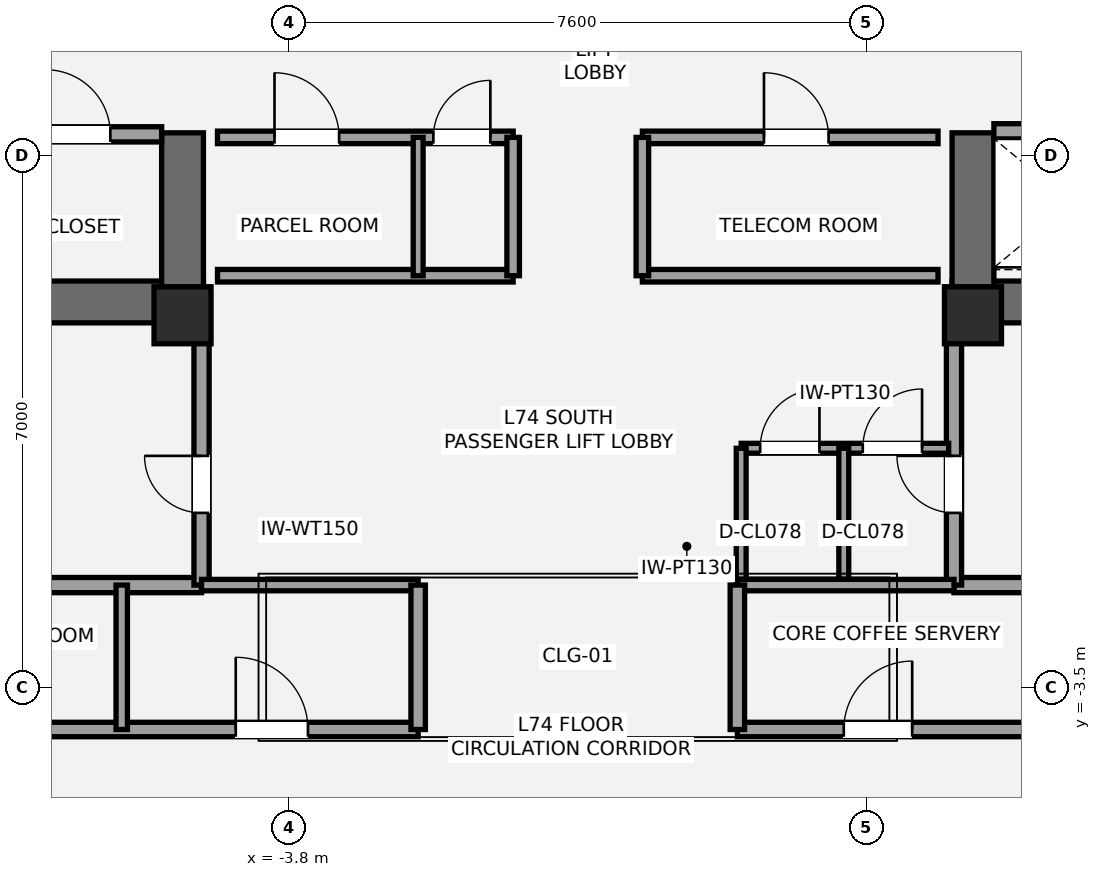
"""IFC4 building model, lengths in metres.
Left out: names, types, materials, properties, quantities, classifications, styles, units other than length and angle.
Written with IfcOpenShell. Run it as: python <this file> out.ifc"""

import sys

from ifc_helpers import new_model, si_unit, direction, frame, frame_2d, origin, origin_2d, place, context, subcontext, project, spatial, rectangle, extrude, element, fill, save


model = new_model("IFC4")
c1 = context("Model", 3, precision=1e-05, world=origin(), true_north=direction((0.0, 1.0)))
c2 = subcontext(c1, "Body", "Model", "MODEL_VIEW")
j1 = project(units=[si_unit("LENGTHUNIT", "METRE"), si_unit("PLANEANGLEUNIT", "RADIAN")], contexts=[c1])
p1 = place(None, origin())
s1 = spatial("IfcSite", under=j1, at=p1, CompositionType="ELEMENT")
p2 = place(p1, origin())
s2 = spatial("IfcBuilding", under=s1, at=p2, CompositionType="ELEMENT")
p3 = place(p2, frame((0.0, 0.0, 260.4)))
s3 = spatial("IfcBuildingStorey", under=s2, at=p3, CompositionType="ELEMENT", Elevation=260.4)
p4 = place(p3, frame((-4.925, 1.575, 0.0), z_axis=(0.0, 0.0, 1.0), x_axis=(-1.0, 0.0, 0.0)))
e1 = element("IfcWall", 1, at=p4, inside=s3, PredefinedType="SHEAR", context=c2, shape_type="SweptSolid", body=[
    extrude(rectangle(XDim=8.775, YDim=0.55, at=frame_2d((4.387, 0.0))), origin(), (0.0, 0.0, 1.0), 4.4),
])
p5 = place(p4, frame((5.375, 0.0, 0.0)))
e2 = element("IfcOpeningElement", 2, at=p5, cuts=e1, PredefinedType="OPENING", context=c2, shape_type="SweptSolid", body=[
    extrude(rectangle(XDim=1.05, YDim=2.15, at=frame_2d((0.525, 1.075))), frame((0.0, 0.285, 0.0), z_axis=(0.0, -1.0, 0.0), x_axis=(1.0, 0.0, 0.0)), (0.0, 0.0, 1.0), 0.57),
])
p6 = place(p4, frame((3.705, 0.0, 0.0)))
e3 = element("IfcOpeningElement", 3, at=p6, cuts=e1, PredefinedType="OPENING", context=c2, shape_type="SweptSolid", body=[
    extrude(rectangle(XDim=1.1, YDim=2.2, at=frame_2d((0.55, 1.1))), frame((0.0, 0.285, 0.0), z_axis=(0.0, -1.0, 0.0), x_axis=(1.0, 0.0, 0.0)), (0.0, 0.0, 1.0), 0.57),
])
p7 = place(p3, frame((-5.2, 1.3, 0.0), z_axis=(0.0, 0.0, 1.0), x_axis=(0.0, 1.0, 0.0)))
e4 = element("IfcWall", 4, at=p7, inside=s3, PredefinedType="SHEAR", context=c2, shape_type="SweptSolid", body=[
    extrude(rectangle(XDim=2.5, YDim=0.55, at=frame_2d((1.25, 0.0))), origin(), (0.0, 0.0, 1.0), 4.4),
])
p8 = place(p3, frame((13.7, 1.575, 0.0), z_axis=(0.0, 0.0, 1.0), x_axis=(-1.0, 0.0, 0.0)))
e5 = element("IfcWall", 5, at=p8, inside=s3, PredefinedType="SHEAR", context=c2, shape_type="SweptSolid", body=[
    extrude(rectangle(XDim=8.775, YDim=0.55, at=frame_2d((4.387, 0.0))), origin(), (0.0, 0.0, 1.0), 4.4),
])
p9 = place(p8, frame((2.35, 0.0, 0.0)))
e6 = element("IfcOpeningElement", 6, at=p9, cuts=e5, PredefinedType="OPENING", context=c2, shape_type="SweptSolid", body=[
    extrude(rectangle(XDim=1.05, YDim=2.15, at=frame_2d((0.525, 1.075))), frame((0.0, 0.285, 0.0), z_axis=(0.0, -1.0, 0.0), x_axis=(1.0, 0.0, 0.0)), (0.0, 0.0, 1.0), 0.57),
])
p10 = place(p8, frame((4.35, 0.0, 0.0)))
e7 = element("IfcOpeningElement", 7, at=p10, cuts=e5, PredefinedType="OPENING", context=c2, shape_type="SweptSolid", body=[
    extrude(rectangle(XDim=1.1, YDim=2.2, at=frame_2d((0.55, 1.1))), frame((0.0, 0.285, 0.0), z_axis=(0.0, -1.0, 0.0), x_axis=(1.0, 0.0, 0.0)), (0.0, 0.0, 1.0), 0.57),
])
p11 = place(p3, frame((5.2, 1.3, 0.0), z_axis=(0.0, 0.0, 1.0), x_axis=(0.0, 1.0, 0.0)))
e8 = element("IfcWall", 8, at=p11, inside=s3, PredefinedType="SHEAR", context=c2, shape_type="SweptSolid", body=[
    extrude(rectangle(XDim=2.5, YDim=0.55, at=frame_2d((1.25, 0.0))), origin(), (0.0, 0.0, 1.0), 4.4),
])
for number, where, z_axis, x_axis in (
    (9, (-5.2, 1.4, 0.0), (0.0, 0.0, 1.0), (1.0, 0.0, 0.0)),
    (10, (5.2, 1.4, 0.0), (0.0, 0.0, 1.0), (1.0, 0.0, 0.0)),
):
    element("IfcColumn", number, at=place(p3, frame(where, z_axis=z_axis, x_axis=x_axis)), inside=s3, PredefinedType="PILASTER", context=c2, shape_type="SweptSolid", body=[
        extrude(rectangle(XDim=0.75, YDim=0.75, at=origin_2d()), origin(), (0.0, 0.0, 1.0), 4.4),
    ])
p12 = place(p3, frame((-7.2, -2.15, 0.0), z_axis=(0.0, 0.0, 1.0), x_axis=(1.0, 0.0, 0.0)))
e11 = element("IfcWall", 11, at=p12, inside=s3, PredefinedType="SOLIDWALL", context=c2, shape_type="SweptSolid", body=[
    extrude(rectangle(XDim=2.25, YDim=0.2, at=frame_2d((1.125, 0.0))), origin(), (0.0, 0.0, 1.0), 4.18),
])
p13 = place(p3, frame((-4.95, -2.15, 0.0), z_axis=(0.0, 0.0, 1.0), x_axis=(0.0, 1.0, 0.0)))
e12 = element("IfcWall", 12, at=p13, inside=s3, PredefinedType="SOLIDWALL", context=c2, shape_type="SweptSolid", body=[
    extrude(rectangle(XDim=3.5, YDim=0.2, at=frame_2d((1.75, 0.0))), origin(), (0.0, 0.0, 1.0), 3.633),
])
p14 = place(p13, frame((0.95, 0.0, 0.0)))
e13 = element("IfcOpeningElement", 13, at=p14, cuts=e12, PredefinedType="OPENING", context=c2, shape_type="SweptSolid", body=[
    extrude(rectangle(XDim=0.75, YDim=2.1, at=frame_2d((0.375, 1.05))), frame((0.0, 0.11, 0.0), z_axis=(0.0, -1.0, 0.0), x_axis=(1.0, 0.0, 0.0)), (0.0, 0.0, 1.0), 0.22),
])
p15 = place(p3, frame((4.95, -2.15, 0.0), z_axis=(0.0, 0.0, 1.0), x_axis=(1.0, 0.0, 0.0)))
e14 = element("IfcWall", 14, at=p15, inside=s3, PredefinedType="SOLIDWALL", context=c2, shape_type="SweptSolid", body=[
    extrude(rectangle(XDim=2.25, YDim=0.2, at=frame_2d((1.125, 0.0))), origin(), (0.0, 0.0, 1.0), 2.37),
])
p16 = place(p3, frame((4.95, -2.15, 0.0), z_axis=(0.0, 0.0, 1.0), x_axis=(0.0, 1.0, 0.0)))
e15 = element("IfcWall", 15, at=p16, inside=s3, PredefinedType="SOLIDWALL", context=c2, shape_type="SweptSolid", body=[
    extrude(rectangle(XDim=3.5, YDim=0.2, at=frame_2d((1.75, 0.0))), origin(), (0.0, 0.0, 1.0), 2.37),
])
p17 = place(p16, frame((0.95, 0.0, 0.0)))
e16 = element("IfcOpeningElement", 16, at=p17, cuts=e15, PredefinedType="OPENING", context=c2, shape_type="SweptSolid", body=[
    extrude(rectangle(XDim=0.75, YDim=2.1, at=frame_2d((0.375, 1.05))), frame((0.0, 0.11, 0.0), z_axis=(0.0, -1.0, 0.0), x_axis=(1.0, 0.0, 0.0)), (0.0, 0.0, 1.0), 0.22),
])
p18 = place(p3, frame((2.15, -0.35, 0.0), z_axis=(0.0, 0.0, 1.0), x_axis=(1.0, 0.0, 0.0)))
e17 = element("IfcWall", 17, at=p18, inside=s3, PredefinedType="PARTITIONING", context=c2, shape_type="SweptSolid", body=[
    extrude(rectangle(XDim=2.73, YDim=0.13, at=frame_2d((1.365, 0.0))), origin(), (0.0, 0.0, 1.0), 3.633),
])
p19 = place(p18, frame((0.25, 0.0, 0.0)))
e18 = element("IfcOpeningElement", 18, at=p19, cuts=e17, PredefinedType="OPENING", context=c2, shape_type="SweptSolid", body=[
    extrude(rectangle(XDim=0.78, YDim=2.1, at=frame_2d((0.39, 1.05))), frame((0.0, 0.075, 0.0), z_axis=(0.0, -1.0, 0.0), x_axis=(1.0, 0.0, 0.0)), (0.0, 0.0, 1.0), 0.15),
])
p20 = place(p18, frame((1.6, 0.0, 0.0)))
e19 = element("IfcOpeningElement", 19, at=p20, cuts=e17, PredefinedType="OPENING", context=c2, shape_type="SweptSolid", body=[
    extrude(rectangle(XDim=0.78, YDim=2.1, at=frame_2d((0.39, 1.05))), frame((0.0, 0.075, 0.0), z_axis=(0.0, -1.0, 0.0), x_axis=(1.0, 0.0, 0.0)), (0.0, 0.0, 1.0), 0.15),
])
for number, where, z_axis, x_axis in (
    (20, (2.15, -2.15, 0.0), (0.0, 0.0, 1.0), (0.0, 1.0, 0.0)),
    (21, (3.5, -2.15, 0.0), (0.0, 0.0, 1.0), (0.0, 1.0, 0.0)),
):
    element("IfcWall", number, at=place(p3, frame(where, z_axis=z_axis, x_axis=x_axis)), inside=s3, PredefinedType="PARTITIONING", context=c2, shape_type="SweptSolid", body=[
        extrude(rectangle(XDim=1.8, YDim=0.13, at=frame_2d((0.9, 0.0))), origin(), (0.0, 0.0, 1.0), 4.18),
    ])
p21 = place(p3, frame((-9.78, 3.78, 0.0), z_axis=(0.0, 0.0, 1.0), x_axis=(1.0, 0.0, 0.0)))
e22 = element("IfcWall", 22, at=p21, inside=s3, PredefinedType="SOLIDWALL", context=c2, shape_type="SweptSolid", body=[
    extrude(rectangle(XDim=4.305, YDim=0.2, at=frame_2d((2.152, 0.0))), origin(), (0.0, 0.0, 1.0), 4.18),
])
p22 = place(p21, frame((2.78, 0.0, 0.0)))
e23 = element("IfcOpeningElement", 23, at=p22, cuts=e22, PredefinedType="OPENING", context=c2, shape_type="SweptSolid", body=[
    extrude(rectangle(XDim=0.85, YDim=2.1, at=frame_2d((0.425, 1.05))), frame((0.0, 0.11, 0.0), z_axis=(0.0, -1.0, 0.0), x_axis=(1.0, 0.0, 0.0)), (0.0, 0.0, 1.0), 0.22),
])
p23 = place(p3, frame((5.475, 3.82, 0.0), z_axis=(0.0, 0.0, 1.0), x_axis=(1.0, 0.0, 0.0)))
e24 = element("IfcWall", 24, at=p23, inside=s3, PredefinedType="SOLIDWALL", context=c2, shape_type="SweptSolid", body=[
    extrude(rectangle(XDim=4.305, YDim=0.2, at=frame_2d((2.152, 0.0))), origin(), (0.0, 0.0, 1.0), 4.18),
])
p24 = place(p23, frame((0.65, 0.0, 0.0)))
e25 = element("IfcOpeningElement", 25, at=p24, cuts=e24, PredefinedType="OPENING", context=c2, shape_type="SweptSolid", body=[
    extrude(rectangle(XDim=1.2, YDim=2.2, at=frame_2d((0.6, 1.1))), frame((0.0, 0.11, 0.0), z_axis=(0.0, -1.0, 0.0), x_axis=(1.0, 0.0, 0.0)), (0.0, 0.0, 1.0), 0.22),
])
p25 = place(p3, frame((-4.74, 1.92, 0.0), z_axis=(0.0, 0.0, 1.0), x_axis=(1.0, 0.0, 0.0)))
e26 = element("IfcWall", 26, at=p25, inside=s3, PredefinedType="PARTITIONING", context=c2, shape_type="SweptSolid", body=[
    extrude(rectangle(XDim=3.89, YDim=0.165, at=frame_2d((1.945, 0.0))), origin(), (0.0, 0.0, 1.0), 3.32),
])
p26 = place(p3, frame((-4.74, 3.74, 0.0), z_axis=(0.0, 0.0, 1.0), x_axis=(1.0, 0.0, 0.0)))
e27 = element("IfcWall", 27, at=p26, inside=s3, PredefinedType="PARTITIONING", context=c2, shape_type="SweptSolid", body=[
    extrude(rectangle(XDim=3.89, YDim=0.165, at=frame_2d((1.945, 0.0))), origin(), (0.0, 0.0, 1.0), 4.18),
])
p27 = place(p26, frame((0.75, 0.0, 0.0)))
e28 = element("IfcOpeningElement", 28, at=p27, cuts=e27, PredefinedType="OPENING", context=c2, shape_type="SweptSolid", body=[
    extrude(rectangle(XDim=0.85, YDim=2.1, at=frame_2d((0.425, 1.05))), frame((0.0, 0.093, 0.0), z_axis=(0.0, -1.0, 0.0), x_axis=(1.0, 0.0, 0.0)), (0.0, 0.0, 1.0), 0.185),
])
p28 = place(p26, frame((2.84, 0.0, 0.0)))
e29 = element("IfcOpeningElement", 29, at=p28, cuts=e27, PredefinedType="OPENING", context=c2, shape_type="SweptSolid", body=[
    extrude(rectangle(XDim=0.75, YDim=2.1, at=frame_2d((0.375, 1.05))), frame((0.0, 0.093, 0.0), z_axis=(0.0, -1.0, 0.0), x_axis=(1.0, 0.0, 0.0)), (0.0, 0.0, 1.0), 0.185),
])
p29 = place(p3, frame((-0.85, 1.92, 0.0), z_axis=(0.0, 0.0, 1.0), x_axis=(0.0, 1.0, 0.0)))
e30 = element("IfcWall", 30, at=p29, inside=s3, PredefinedType="PARTITIONING", context=c2, shape_type="SweptSolid", body=[
    extrude(rectangle(XDim=1.82, YDim=0.165, at=frame_2d((0.91, 0.0))), origin(), (0.0, 0.0, 1.0), 4.18),
])
p30 = place(p3, frame((0.85, 1.92, 0.0), z_axis=(0.0, 0.0, 1.0), x_axis=(1.0, 0.0, 0.0)))
e31 = element("IfcWall", 31, at=p30, inside=s3, PredefinedType="PARTITIONING", context=c2, shape_type="SweptSolid", body=[
    extrude(rectangle(XDim=3.89, YDim=0.165, at=frame_2d((1.945, 0.0))), origin(), (0.0, 0.0, 1.0), 3.32),
])
p31 = place(p3, frame((0.85, 3.74, 0.0), z_axis=(0.0, 0.0, 1.0), x_axis=(1.0, 0.0, 0.0)))
e32 = element("IfcWall", 32, at=p31, inside=s3, PredefinedType="PARTITIONING", context=c2, shape_type="SweptSolid", body=[
    extrude(rectangle(XDim=3.89, YDim=0.165, at=frame_2d((1.945, 0.0))), origin(), (0.0, 0.0, 1.0), 4.18),
])
p32 = place(p31, frame((1.6, 0.0, 0.0)))
e33 = element("IfcOpeningElement", 33, at=p32, cuts=e32, PredefinedType="OPENING", context=c2, shape_type="SweptSolid", body=[
    extrude(rectangle(XDim=0.85, YDim=2.1, at=frame_2d((0.425, 1.05))), frame((0.0, 0.093, 0.0), z_axis=(0.0, -1.0, 0.0), x_axis=(1.0, 0.0, 0.0)), (0.0, 0.0, 1.0), 0.185),
])
p33 = place(p3, frame((0.85, 1.92, 0.0), z_axis=(0.0, 0.0, 1.0), x_axis=(0.0, 1.0, 0.0)))
e34 = element("IfcWall", 34, at=p33, inside=s3, PredefinedType="PARTITIONING", context=c2, shape_type="SweptSolid", body=[
    extrude(rectangle(XDim=1.82, YDim=0.165, at=frame_2d((0.91, 0.0))), origin(), (0.0, 0.0, 1.0), 4.18),
])
p34 = place(p3, frame((-2.1, 1.92, 0.0), z_axis=(0.0, 0.0, 1.0), x_axis=(0.0, 1.0, 0.0)))
e35 = element("IfcWall", 35, at=p34, inside=s3, PredefinedType="PARTITIONING", context=c2, shape_type="SweptSolid", body=[
    extrude(rectangle(XDim=1.82, YDim=0.13, at=frame_2d((0.91, 0.0))), origin(), (0.0, 0.0, 1.0), 4.18),
])
p35 = place(p3, frame((-13.45, -4.05, 0.0), z_axis=(0.0, 0.0, 1.0), x_axis=(1.0, 0.0, 0.0)))
e36 = element("IfcWall", 36, at=p35, inside=s3, PredefinedType="PLUMBINGWALL", context=c2, shape_type="SweptSolid", body=[
    extrude(rectangle(XDim=11.35, YDim=0.19, at=frame_2d((5.675, 0.0))), origin(), (0.0, 0.0, 1.0), 3.567),
])
p36 = place(p35, frame((1.25, 0.0, 0.0)))
e37 = element("IfcOpeningElement", 37, at=p36, cuts=e36, PredefinedType="OPENING", context=c2, shape_type="SweptSolid", body=[
    extrude(rectangle(XDim=0.85, YDim=2.1, at=frame_2d((0.425, 1.05))), frame((0.0, 0.105, 0.0), z_axis=(0.0, -1.0, 0.0), x_axis=(1.0, 0.0, 0.0)), (0.0, 0.0, 1.0), 0.21),
])
p37 = place(p35, frame((5.1, 0.0, 0.0)))
e38 = element("IfcOpeningElement", 38, at=p37, cuts=e36, PredefinedType="OPENING", context=c2, shape_type="SweptSolid", body=[
    extrude(rectangle(XDim=0.85, YDim=2.1, at=frame_2d((0.425, 1.05))), frame((0.0, 0.105, 0.0), z_axis=(0.0, -1.0, 0.0), x_axis=(1.0, 0.0, 0.0)), (0.0, 0.0, 1.0), 0.21),
])
p38 = place(p35, frame((8.95, 0.0, 0.0)))
e39 = element("IfcOpeningElement", 39, at=p38, cuts=e36, PredefinedType="OPENING", context=c2, shape_type="SweptSolid", body=[
    extrude(rectangle(XDim=0.95, YDim=2.15, at=frame_2d((0.475, 1.075))), frame((0.0, 0.105, 0.0), z_axis=(0.0, -1.0, 0.0), x_axis=(1.0, 0.0, 0.0)), (0.0, 0.0, 1.0), 0.21),
])
p39 = place(p3, frame((-4.95, -2.15, 0.0), z_axis=(0.0, 0.0, 1.0), x_axis=(1.0, 0.0, 0.0)))
e40 = element("IfcWall", 40, at=p39, inside=s3, PredefinedType="PLUMBINGWALL", context=c2, shape_type="SweptSolid", body=[
    extrude(rectangle(XDim=2.85, YDim=0.15, at=frame_2d((1.425, 0.0))), origin(), (0.0, 0.0, 1.0), 3.633),
])
p40 = place(p3, frame((-2.1, -4.05, 0.0), z_axis=(0.0, 0.0, 1.0), x_axis=(0.0, 1.0, 0.0)))
e41 = element("IfcWall", 41, at=p40, inside=s3, PredefinedType="PLUMBINGWALL", context=c2, shape_type="SweptSolid", body=[
    extrude(rectangle(XDim=1.9, YDim=0.19, at=frame_2d((0.95, 0.0))), origin(), (0.0, 0.0, 1.0), 4.18),
])
p41 = place(p3, frame((-6.0, -4.05, 0.0), z_axis=(0.0, 0.0, 1.0), x_axis=(0.0, 1.0, 0.0)))
e42 = element("IfcWall", 42, at=p41, inside=s3, PredefinedType="PLUMBINGWALL", context=c2, shape_type="SweptSolid", body=[
    extrude(rectangle(XDim=1.9, YDim=0.15, at=frame_2d((0.95, 0.0))), origin(), (0.0, 0.0, 1.0), 3.641),
])
p42 = place(p3, frame((2.1, -4.05, 0.0), z_axis=(0.0, 0.0, 1.0), x_axis=(1.0, 0.0, 0.0)))
e43 = element("IfcWall", 43, at=p42, inside=s3, PredefinedType="PLUMBINGWALL", context=c2, shape_type="SweptSolid", body=[
    extrude(rectangle(XDim=11.35, YDim=0.19, at=frame_2d((5.675, 0.0))), origin(), (0.0, 0.0, 1.0), 2.37),
])
p43 = place(p42, frame((1.4, 0.0, 0.0)))
e44 = element("IfcOpeningElement", 44, at=p43, cuts=e43, PredefinedType="OPENING", context=c2, shape_type="SweptSolid", body=[
    extrude(rectangle(XDim=0.9, YDim=2.1, at=frame_2d((0.45, 1.05))), frame((0.0, 0.105, 0.0), z_axis=(0.0, -1.0, 0.0), x_axis=(1.0, 0.0, 0.0)), (0.0, 0.0, 1.0), 0.21),
])
p44 = place(p42, frame((5.3, 0.0, 0.0)))
e45 = element("IfcOpeningElement", 45, at=p44, cuts=e43, PredefinedType="OPENING", context=c2, shape_type="SweptSolid", body=[
    extrude(rectangle(XDim=0.9, YDim=2.1, at=frame_2d((0.45, 1.05))), frame((0.0, 0.105, 0.0), z_axis=(0.0, -1.0, 0.0), x_axis=(1.0, 0.0, 0.0)), (0.0, 0.0, 1.0), 0.21),
])
p45 = place(p42, frame((9.1, 0.0, 0.0)))
e46 = element("IfcOpeningElement", 46, at=p45, cuts=e43, PredefinedType="OPENING", context=c2, shape_type="SweptSolid", body=[
    extrude(rectangle(XDim=0.9, YDim=2.1, at=frame_2d((0.45, 1.05))), frame((0.0, 0.105, 0.0), z_axis=(0.0, -1.0, 0.0), x_axis=(1.0, 0.0, 0.0)), (0.0, 0.0, 1.0), 0.21),
])
p46 = place(p3, frame((2.1, -2.15, 0.0), z_axis=(0.0, 0.0, 1.0), x_axis=(1.0, 0.0, 0.0)))
e47 = element("IfcWall", 47, at=p46, inside=s3, PredefinedType="PLUMBINGWALL", context=c2, shape_type="SweptSolid", body=[
    extrude(rectangle(XDim=2.85, YDim=0.15, at=frame_2d((1.425, 0.0))), origin(), (0.0, 0.0, 1.0), 4.18),
])
p47 = place(p3, frame((2.1, -4.05, 0.0), z_axis=(0.0, 0.0, 1.0), x_axis=(0.0, 1.0, 0.0)))
e48 = element("IfcWall", 48, at=p47, inside=s3, PredefinedType="PLUMBINGWALL", context=c2, shape_type="SweptSolid", body=[
    extrude(rectangle(XDim=1.9, YDim=0.19, at=frame_2d((0.95, 0.0))), origin(), (0.0, 0.0, 1.0), 4.18),
])
p48 = place(p14, origin())
e49 = element("IfcDoor", 49, at=p48, inside=s3, OperationType="SINGLE_SWING_RIGHT", PredefinedType="DOOR", context=c2, shape_type="SweptSolid", body=[
    extrude(rectangle(XDim=0.75, YDim=2.1, at=frame_2d((0.375, 1.05))), frame((0.0, 0.025, 0.0), z_axis=(0.0, -1.0, 0.0), x_axis=(1.0, 0.0, 0.0)), (0.0, 0.0, 1.0), 0.05),
])
fill(e13, e49)
p49 = place(p17, origin())
e50 = element("IfcDoor", 50, at=p49, inside=s3, OperationType="SINGLE_SWING_RIGHT", PredefinedType="DOOR", context=c2, shape_type="SweptSolid", body=[
    extrude(rectangle(XDim=0.75, YDim=2.1, at=frame_2d((0.375, 1.05))), frame((0.0, 0.025, 0.0), z_axis=(0.0, -1.0, 0.0), x_axis=(1.0, 0.0, 0.0)), (0.0, 0.0, 1.0), 0.05),
])
fill(e16, e50)
p50 = place(p19, origin())
e51 = element("IfcDoor", 51, at=p50, inside=s3, OperationType="SINGLE_SWING_RIGHT", PredefinedType="DOOR", context=c2, shape_type="SweptSolid", body=[
    extrude(rectangle(XDim=0.78, YDim=2.1, at=frame_2d((0.39, 1.05))), frame((0.0, 0.025, 0.0), z_axis=(0.0, -1.0, 0.0), x_axis=(1.0, 0.0, 0.0)), (0.0, 0.0, 1.0), 0.05),
])
fill(e18, e51)
p51 = place(p20, origin())
e52 = element("IfcDoor", 52, at=p51, inside=s3, OperationType="SINGLE_SWING_RIGHT", PredefinedType="DOOR", context=c2, shape_type="SweptSolid", body=[
    extrude(rectangle(XDim=0.78, YDim=2.1, at=frame_2d((0.39, 1.05))), frame((0.0, 0.025, 0.0), z_axis=(0.0, -1.0, 0.0), x_axis=(1.0, 0.0, 0.0)), (0.0, 0.0, 1.0), 0.05),
])
fill(e19, e52)
p52 = place(p22, origin())
e53 = element("IfcDoor", 53, at=p52, inside=s3, OperationType="SINGLE_SWING_LEFT", PredefinedType="DOOR", context=c2, shape_type="SweptSolid", body=[
    extrude(rectangle(XDim=0.85, YDim=2.1, at=frame_2d((0.425, 1.05))), frame((0.0, 0.025, 0.0), z_axis=(0.0, -1.0, 0.0), x_axis=(1.0, 0.0, 0.0)), (0.0, 0.0, 1.0), 0.05),
])
fill(e23, e53)
p53 = place(p27, origin())
e54 = element("IfcDoor", 54, at=p53, inside=s3, OperationType="SINGLE_SWING_LEFT", PredefinedType="DOOR", context=c2, shape_type="SweptSolid", body=[
    extrude(rectangle(XDim=0.85, YDim=2.1, at=frame_2d((0.425, 1.05))), frame((0.0, 0.025, 0.0), z_axis=(0.0, -1.0, 0.0), x_axis=(1.0, 0.0, 0.0)), (0.0, 0.0, 1.0), 0.05),
])
fill(e28, e54)
p54 = place(p28, origin())
e55 = element("IfcDoor", 55, at=p54, inside=s3, OperationType="SINGLE_SWING_RIGHT", PredefinedType="DOOR", context=c2, shape_type="SweptSolid", body=[
    extrude(rectangle(XDim=0.75, YDim=2.1, at=frame_2d((0.375, 1.05))), frame((0.0, 0.025, 0.0), z_axis=(0.0, -1.0, 0.0), x_axis=(1.0, 0.0, 0.0)), (0.0, 0.0, 1.0), 0.05),
])
fill(e29, e55)
p55 = place(p32, origin())
e56 = element("IfcDoor", 56, at=p55, inside=s3, OperationType="SINGLE_SWING_LEFT", PredefinedType="DOOR", context=c2, shape_type="SweptSolid", body=[
    extrude(rectangle(XDim=0.85, YDim=2.1, at=frame_2d((0.425, 1.05))), frame((0.0, 0.025, 0.0), z_axis=(0.0, -1.0, 0.0), x_axis=(1.0, 0.0, 0.0)), (0.0, 0.0, 1.0), 0.05),
])
fill(e33, e56)
p56 = place(p38, origin())
e57 = element("IfcDoor", 57, at=p56, inside=s3, OperationType="SINGLE_SWING_LEFT", PredefinedType="DOOR", context=c2, shape_type="SweptSolid", body=[
    extrude(rectangle(XDim=0.95, YDim=2.15, at=frame_2d((0.475, 1.075))), frame((0.0, 0.025, 0.0), z_axis=(0.0, -1.0, 0.0), x_axis=(1.0, 0.0, 0.0)), (0.0, 0.0, 1.0), 0.05),
])
fill(e39, e57)
p57 = place(p43, origin())
e58 = element("IfcDoor", 58, at=p57, inside=s3, OperationType="SINGLE_SWING_RIGHT", PredefinedType="DOOR", context=c2, shape_type="SweptSolid", body=[
    extrude(rectangle(XDim=0.9, YDim=2.1, at=frame_2d((0.45, 1.05))), frame((0.0, 0.025, 0.0), z_axis=(0.0, -1.0, 0.0), x_axis=(1.0, 0.0, 0.0)), (0.0, 0.0, 1.0), 0.05),
])
fill(e44, e58)
save(model, sys.argv[1])
